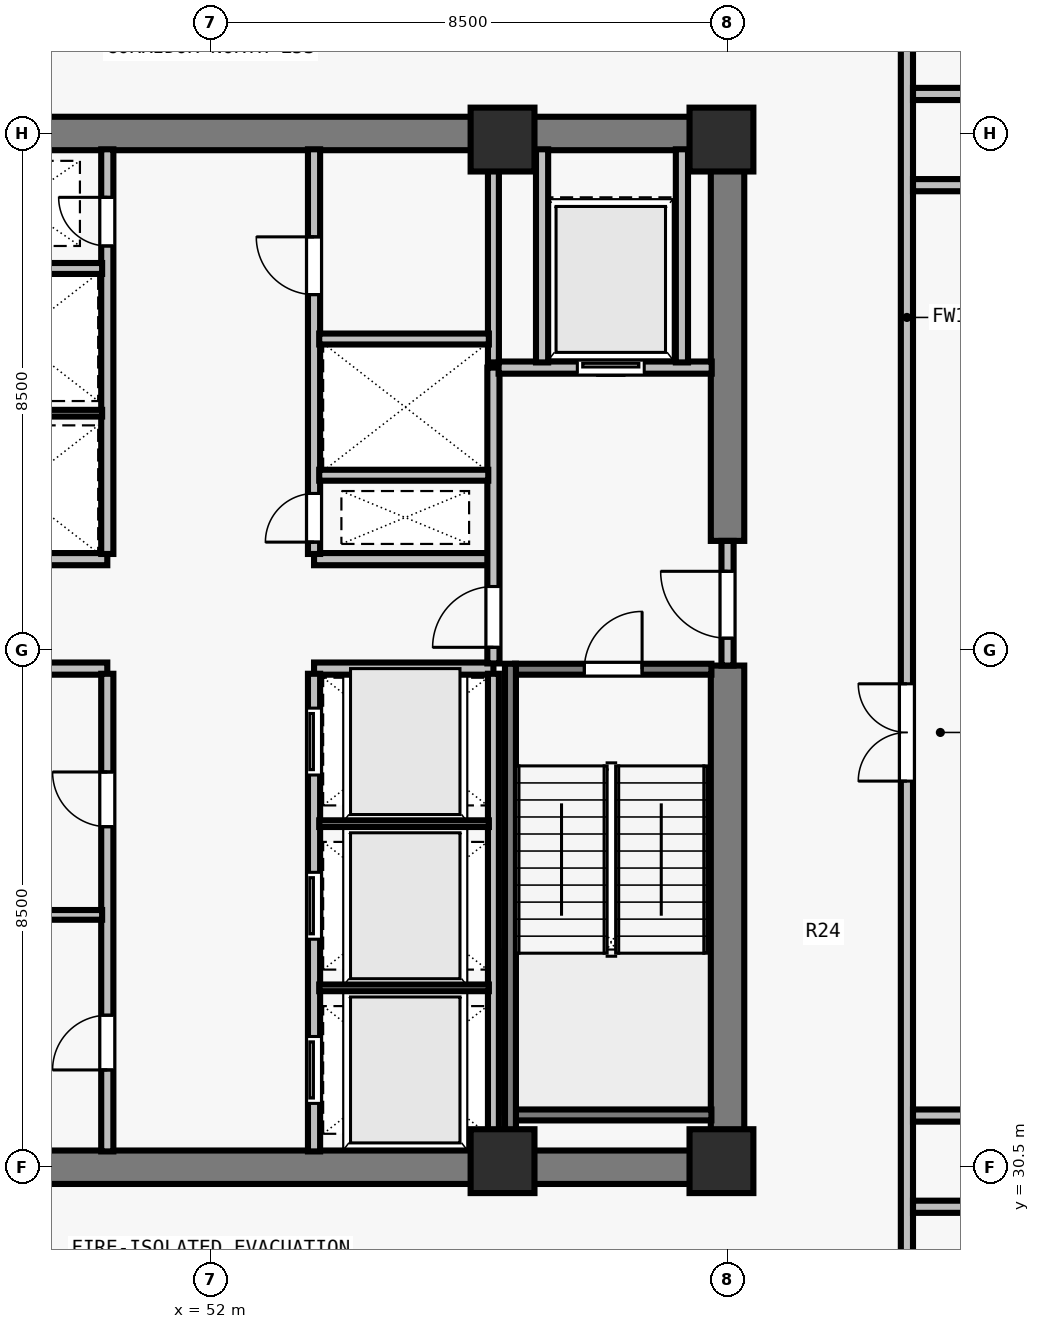
"""IFC4 building model, lengths in metres.
Left out: names, types, materials, properties, quantities, classifications, styles, units other than length and angle.
Written with IfcOpenShell. Run it as: python <this file> out.ifc"""

import sys

from ifc_helpers import new_model, si_unit, direction, frame, frame_2d, origin, origin_2d, place, context, subcontext, project, spatial, rectangle, extrude, element, fill, save


model = new_model("IFC4")
c1 = context("Model", 3, precision=1e-05, world=origin(), true_north=direction((0.0, 1.0)))
c2 = subcontext(c1, "Body", "Model", "MODEL_VIEW")
j1 = project(units=[si_unit("LENGTHUNIT", "METRE"), si_unit("PLANEANGLEUNIT", "RADIAN")], contexts=[c1])
p1 = place(None, origin())
s1 = spatial("IfcSite", under=j1, at=p1, CompositionType="ELEMENT")
p2 = place(p1, origin())
s2 = spatial("IfcBuilding", under=s1, at=p2, CompositionType="ELEMENT")
p3 = place(p2, frame((0.0, 0.0, 193.5)))
s3 = spatial("IfcBuildingStorey", under=s2, at=p3, CompositionType="ELEMENT", Elevation=193.5)
for number, where, z_axis, x_axis in (
    (1, (56.8, 30.6, 0.0), (0.0, 0.0, 1.0), (1.0, 0.0, 0.0)),
    (2, (60.4, 30.6, 0.0), (0.0, 0.0, 1.0), (1.0, 0.0, 0.0)),
    (3, (56.8, 47.4, 0.0), (0.0, 0.0, 1.0), (1.0, 0.0, 0.0)),
    (4, (60.4, 47.4, 0.0), (0.0, 0.0, 1.0), (1.0, 0.0, 0.0)),
):
    element("IfcColumn", number, at=place(p3, frame(where, z_axis=z_axis, x_axis=x_axis)), inside=s3, PredefinedType="COLUMN", context=c2, shape_type="SweptSolid", body=[
        extrude(rectangle(XDim=1.05, YDim=1.05, at=origin_2d()), origin(), (0.0, 0.0, 1.0), 4.5),
    ])
for number, where, z_axis, x_axis in (
    (5, (43.225, 30.5, 0.0), (0.0, 0.0, 1.0), (1.0, 0.0, 0.0)),
    (6, (43.225, 47.5, 0.0), (0.0, 0.0, 1.0), (1.0, 0.0, 0.0)),
):
    element("IfcWall", number, at=place(p3, frame(where, z_axis=z_axis, x_axis=x_axis)), inside=s3, PredefinedType="SHEAR", context=c2, shape_type="SweptSolid", body=[
        extrude(rectangle(XDim=17.55, YDim=0.55, at=frame_2d((8.775, 0.0))), origin(), (0.0, 0.0, 1.0), 4.29),
    ])
p4 = place(p3, frame((60.5, 30.765, 0.0), z_axis=(0.0, 0.0, 1.0), x_axis=(0.0, 1.0, 0.0)))
e7 = element("IfcWall", 7, at=p4, inside=s3, PredefinedType="SHEAR", context=c2, shape_type="SweptSolid", body=[
    extrude(rectangle(XDim=7.985, YDim=0.55, at=frame_2d((3.993, 0.0))), origin(), (0.0, 0.0, 1.0), 4.29),
])
p5 = place(p3, frame((60.5, 40.8, 0.0), z_axis=(0.0, 0.0, 1.0), x_axis=(0.0, 1.0, 0.0)))
e8 = element("IfcWall", 8, at=p5, inside=s3, PredefinedType="SHEAR", context=c2, shape_type="SweptSolid", body=[
    extrude(rectangle(XDim=6.435, YDim=0.55, at=frame_2d((3.218, 0.0))), origin(), (0.0, 0.0, 1.0), 4.29),
])
for number, where, z_axis, x_axis in (
    (9, (47.35, 38.7, 0.0), (0.0, 0.0, 1.0), (1.0, 0.0, 0.0)),
    (10, (47.35, 40.5, 0.0), (0.0, 0.0, 1.0), (1.0, 0.0, 0.0)),
    (11, (53.7, 38.7, 0.0), (0.0, 0.0, 1.0), (1.0, 0.0, 0.0)),
    (12, (53.7, 40.5, 0.0), (0.0, 0.0, 1.0), (1.0, 0.0, 0.0)),
):
    element("IfcWall", number, at=place(p3, frame(where, z_axis=z_axis, x_axis=x_axis)), inside=s3, PredefinedType="SOLIDWALL", context=c2, shape_type="SweptSolid", body=[
        extrude(rectangle(XDim=2.95, YDim=0.2, at=frame_2d((1.475, 0.0))), origin(), (0.0, 0.0, 1.0), 4.29),
    ])
p6 = place(p3, frame((50.3, 30.76, 0.0), z_axis=(0.0, 0.0, 1.0), x_axis=(0.0, 1.0, 0.0)))
e13 = element("IfcWall", 13, at=p6, inside=s3, PredefinedType="SOLIDWALL", context=c2, shape_type="SweptSolid", body=[
    extrude(rectangle(XDim=7.855, YDim=0.2, at=frame_2d((3.927, 0.0))), origin(), (0.0, 0.0, 1.0), 4.29),
])
p7 = place(p6, frame((1.34, 0.0, 0.0)))
e14 = element("IfcOpeningElement", 14, at=p7, cuts=e13, PredefinedType="OPENING", context=c2, shape_type="SweptSolid", body=[
    extrude(rectangle(XDim=0.9, YDim=2.12, at=frame_2d((0.45, 1.06))), frame((0.0, 0.11, 0.0), z_axis=(0.0, -1.0, 0.0), x_axis=(1.0, 0.0, 0.0)), (0.0, 0.0, 1.0), 0.22),
])
p8 = place(p6, frame((5.34, 0.0, 0.0)))
e15 = element("IfcOpeningElement", 15, at=p8, cuts=e13, PredefinedType="OPENING", context=c2, shape_type="SweptSolid", body=[
    extrude(rectangle(XDim=0.9, YDim=2.12, at=frame_2d((0.45, 1.06))), frame((0.0, 0.11, 0.0), z_axis=(0.0, -1.0, 0.0), x_axis=(1.0, 0.0, 0.0)), (0.0, 0.0, 1.0), 0.22),
])
p9 = place(p3, frame((53.7, 30.76, 0.0), z_axis=(0.0, 0.0, 1.0), x_axis=(0.0, 1.0, 0.0)))
e16 = element("IfcWall", 16, at=p9, inside=s3, PredefinedType="SOLIDWALL", context=c2, shape_type="SweptSolid", body=[
    extrude(rectangle(XDim=7.855, YDim=0.2, at=frame_2d((3.927, 0.0))), origin(), (0.0, 0.0, 1.0), 4.29),
])
p10 = place(p9, frame((0.79, 0.0, 0.0)))
e17 = element("IfcOpeningElement", 17, at=p10, cuts=e16, PredefinedType="OPENING", context=c2, shape_type="SweptSolid", body=[
    extrude(rectangle(XDim=1.1, YDim=2.2, at=frame_2d((0.55, 1.1))), frame((0.0, 0.11, 0.0), z_axis=(0.0, -1.0, 0.0), x_axis=(1.0, 0.0, 0.0)), (0.0, 0.0, 1.0), 0.22),
])
p11 = place(p9, frame((3.49, 0.0, 0.0)))
e18 = element("IfcOpeningElement", 18, at=p11, cuts=e16, PredefinedType="OPENING", context=c2, shape_type="SweptSolid", body=[
    extrude(rectangle(XDim=1.1, YDim=2.2, at=frame_2d((0.55, 1.1))), frame((0.0, 0.11, 0.0), z_axis=(0.0, -1.0, 0.0), x_axis=(1.0, 0.0, 0.0)), (0.0, 0.0, 1.0), 0.22),
])
p12 = place(p9, frame((6.19, 0.0, 0.0)))
e19 = element("IfcOpeningElement", 19, at=p12, cuts=e16, PredefinedType="OPENING", context=c2, shape_type="SweptSolid", body=[
    extrude(rectangle(XDim=1.1, YDim=2.2, at=frame_2d((0.55, 1.1))), frame((0.0, 0.11, 0.0), z_axis=(0.0, -1.0, 0.0), x_axis=(1.0, 0.0, 0.0)), (0.0, 0.0, 1.0), 0.22),
])
p13 = place(p3, frame((50.3, 40.585, 0.0), z_axis=(0.0, 0.0, 1.0), x_axis=(0.0, 1.0, 0.0)))
e20 = element("IfcWall", 20, at=p13, inside=s3, PredefinedType="SOLIDWALL", context=c2, shape_type="SweptSolid", body=[
    extrude(rectangle(XDim=6.655, YDim=0.2, at=frame_2d((3.328, 0.0))), origin(), (0.0, 0.0, 1.0), 4.29),
])
p14 = place(p13, frame((5.065, 0.0, 0.0)))
e21 = element("IfcOpeningElement", 21, at=p14, cuts=e20, PredefinedType="OPENING", context=c2, shape_type="SweptSolid", body=[
    extrude(rectangle(XDim=0.8, YDim=2.08, at=frame_2d((0.4, 1.04))), frame((0.0, 0.11, 0.0), z_axis=(0.0, -1.0, 0.0), x_axis=(1.0, 0.0, 0.0)), (0.0, 0.0, 1.0), 0.22),
])
p15 = place(p3, frame((53.7, 40.585, 0.0), z_axis=(0.0, 0.0, 1.0), x_axis=(0.0, 1.0, 0.0)))
e22 = element("IfcWall", 22, at=p15, inside=s3, PredefinedType="SOLIDWALL", context=c2, shape_type="SweptSolid", body=[
    extrude(rectangle(XDim=6.655, YDim=0.2, at=frame_2d((3.328, 0.0))), origin(), (0.0, 0.0, 1.0), 4.29),
])
p16 = place(p15, frame((0.195, 0.0, 0.0)))
e23 = element("IfcOpeningElement", 23, at=p16, cuts=e22, PredefinedType="OPENING", context=c2, shape_type="SweptSolid", body=[
    extrude(rectangle(XDim=0.8, YDim=2.08, at=frame_2d((0.4, 1.04))), frame((0.0, 0.11, 0.0), z_axis=(0.0, -1.0, 0.0), x_axis=(1.0, 0.0, 0.0)), (0.0, 0.0, 1.0), 0.22),
])
p17 = place(p15, frame((4.265, 0.0, 0.0)))
e24 = element("IfcOpeningElement", 24, at=p17, cuts=e22, PredefinedType="OPENING", context=c2, shape_type="SweptSolid", body=[
    extrude(rectangle(XDim=0.95, YDim=2.12, at=frame_2d((0.475, 1.06))), frame((0.0, 0.11, 0.0), z_axis=(0.0, -1.0, 0.0), x_axis=(1.0, 0.0, 0.0)), (0.0, 0.0, 1.0), 0.22),
])
p18 = place(p3, frame((60.5, 38.75, 0.0), z_axis=(0.0, 0.0, 1.0), x_axis=(0.0, 1.0, 0.0)))
e25 = element("IfcWall", 25, at=p18, inside=s3, PredefinedType="SOLIDWALL", context=c2, shape_type="SweptSolid", body=[
    extrude(rectangle(XDim=2.05, YDim=0.2, at=frame_2d((1.025, 0.0))), origin(), (0.0, 0.0, 1.0), 4.29),
])
p19 = place(p18, frame((0.45, 0.0, 0.0)))
e26 = element("IfcOpeningElement", 26, at=p19, cuts=e25, PredefinedType="OPENING", context=c2, shape_type="SweptSolid", body=[
    extrude(rectangle(XDim=1.1, YDim=2.15, at=frame_2d((0.55, 1.075))), frame((0.0, 0.11, 0.0), z_axis=(0.0, -1.0, 0.0), x_axis=(1.0, 0.0, 0.0)), (0.0, 0.0, 1.0), 0.22),
])
p20 = place(p3, frame((56.65, 38.785, 0.0), z_axis=(0.0, 0.0, 1.0), x_axis=(0.0, 1.0, 0.0)))
e27 = element("IfcWall", 27, at=p20, inside=s3, PredefinedType="SOLIDWALL", context=c2, shape_type="SweptSolid", body=[
    extrude(rectangle(XDim=4.865, YDim=0.2, at=frame_2d((2.433, 0.0))), origin(), (0.0, 0.0, 1.0), 4.29),
])
p21 = place(p20, frame((0.265, 0.0, 0.0)))
e28 = element("IfcOpeningElement", 28, at=p21, cuts=e27, PredefinedType="OPENING", context=c2, shape_type="SweptSolid", body=[
    extrude(rectangle(XDim=1.0, YDim=2.15, at=frame_2d((0.5, 1.075))), frame((0.0, 0.11, 0.0), z_axis=(0.0, -1.0, 0.0), x_axis=(1.0, 0.0, 0.0)), (0.0, 0.0, 1.0), 0.22),
])
p22 = place(p3, frame((56.735, 43.65, 0.0), z_axis=(0.0, 0.0, 1.0), x_axis=(1.0, 0.0, 0.0)))
e29 = element("IfcWall", 29, at=p22, inside=s3, PredefinedType="SOLIDWALL", context=c2, shape_type="SweptSolid", body=[
    extrude(rectangle(XDim=3.505, YDim=0.2, at=frame_2d((1.752, 0.0))), origin(), (0.0, 0.0, 1.0), 4.29),
])
p23 = place(p22, frame((1.295, 0.0, 0.0)))
e30 = element("IfcOpeningElement", 30, at=p23, cuts=e29, PredefinedType="OPENING", context=c2, shape_type="SweptSolid", body=[
    extrude(rectangle(XDim=1.1, YDim=2.2, at=frame_2d((0.55, 1.1))), frame((0.0, 0.11, 0.0), z_axis=(0.0, -1.0, 0.0), x_axis=(1.0, 0.0, 0.0)), (0.0, 0.0, 1.0), 0.22),
])
for number, where, z_axis, x_axis in (
    (31, (57.45, 43.735, 0.0), (0.0, 0.0, 1.0), (0.0, 1.0, 0.0)),
    (32, (59.75, 43.735, 0.0), (0.0, 0.0, 1.0), (0.0, 1.0, 0.0)),
):
    element("IfcWall", number, at=place(p3, frame(where, z_axis=z_axis, x_axis=x_axis)), inside=s3, PredefinedType="SOLIDWALL", context=c2, shape_type="SweptSolid", body=[
        extrude(rectangle(XDim=3.505, YDim=0.2, at=frame_2d((1.752, 0.0))), origin(), (0.0, 0.0, 1.0), 4.29),
    ])
p24 = place(p3, frame((47.415, 34.65, 0.0), z_axis=(0.0, 0.0, 1.0), x_axis=(1.0, 0.0, 0.0)))
e33 = element("IfcWall", 33, at=p24, inside=s3, PredefinedType="PARTITIONING", context=c2, shape_type="SweptSolid", body=[
    extrude(rectangle(XDim=2.8, YDim=0.16, at=frame_2d((1.4, 0.0))), origin(), (0.0, 0.0, 1.0), 4.29),
])
p25 = place(p3, frame((56.65, 30.76, 0.0), z_axis=(0.0, 0.0, 1.0), x_axis=(0.0, 1.0, 0.0)))
e34 = element("IfcWall", 34, at=p25, inside=s3, PredefinedType="SOLIDWALL", context=c2, shape_type="SweptSolid", body=[
    extrude(rectangle(XDim=7.855, YDim=0.18, at=frame_2d((3.927, 0.0))), origin(), (0.0, 0.0, 1.0), 4.29),
])
for number, where, z_axis, x_axis in (
    (35, (53.785, 33.45, 0.0), (0.0, 0.0, 1.0), (1.0, 0.0, 0.0)),
    (36, (53.785, 36.15, 0.0), (0.0, 0.0, 1.0), (1.0, 0.0, 0.0)),
):
    element("IfcWall", number, at=place(p3, frame(where, z_axis=z_axis, x_axis=x_axis)), inside=s3, PredefinedType="PARTITIONING", context=c2, shape_type="SweptSolid", body=[
        extrude(rectangle(XDim=2.79, YDim=0.11, at=frame_2d((1.395, 0.0))), origin(), (0.0, 0.0, 1.0), 4.29),
    ])
p26 = place(p3, frame((47.435, 42.9, 0.0), z_axis=(0.0, 0.0, 1.0), x_axis=(1.0, 0.0, 0.0)))
e37 = element("IfcWall", 37, at=p26, inside=s3, PredefinedType="PARTITIONING", context=c2, shape_type="SweptSolid", body=[
    extrude(rectangle(XDim=2.78, YDim=0.11, at=frame_2d((1.39, 0.0))), origin(), (0.0, 0.0, 1.0), 4.29),
])
p27 = place(p3, frame((47.425, 45.28, 0.0), z_axis=(0.0, 0.0, 1.0), x_axis=(1.0, 0.0, 0.0)))
e38 = element("IfcWall", 38, at=p27, inside=s3, PredefinedType="SOLIDWALL", context=c2, shape_type="SweptSolid", body=[
    extrude(rectangle(XDim=2.79, YDim=0.18, at=frame_2d((1.395, 0.0))), origin(), (0.0, 0.0, 1.0), 4.29),
])
p28 = place(p3, frame((56.65, 43.735, 0.0), z_axis=(0.0, 0.0, 1.0), x_axis=(0.0, 1.0, 0.0)))
e39 = element("IfcWall", 39, at=p28, inside=s3, PredefinedType="SOLIDWALL", context=c2, shape_type="SweptSolid", body=[
    extrude(rectangle(XDim=3.505, YDim=0.18, at=frame_2d((1.752, 0.0))), origin(), (0.0, 0.0, 1.0), 4.29),
])
p29 = place(p3, frame((53.785, 41.88, 0.0), z_axis=(0.0, 0.0, 1.0), x_axis=(1.0, 0.0, 0.0)))
e40 = element("IfcWall", 40, at=p29, inside=s3, PredefinedType="SOLIDWALL", context=c2, shape_type="SweptSolid", body=[
    extrude(rectangle(XDim=2.78, YDim=0.18, at=frame_2d((1.39, 0.0))), origin(), (0.0, 0.0, 1.0), 4.29),
])
p30 = place(p3, frame((53.785, 44.12, 0.0), z_axis=(0.0, 0.0, 1.0), x_axis=(1.0, 0.0, 0.0)))
e41 = element("IfcWall", 41, at=p30, inside=s3, PredefinedType="SOLIDWALL", context=c2, shape_type="SweptSolid", body=[
    extrude(rectangle(XDim=2.79, YDim=0.18, at=frame_2d((1.395, 0.0))), origin(), (0.0, 0.0, 1.0), 4.29),
])
p31 = place(p3, frame((63.45, 27.65, 0.0), z_axis=(0.0, 0.0, 1.0), x_axis=(0.0, 1.0, 0.0)))
e42 = element("IfcWall", 42, at=p31, inside=s3, PredefinedType="SOLIDWALL", context=c2, shape_type="SweptSolid", body=[
    extrude(rectangle(XDim=22.7, YDim=0.2, at=frame_2d((11.35, 0.0))), origin(), (0.0, 0.0, 1.0), 4.29),
])
p32 = place(p31, frame((9.2, 0.0, 0.0)))
e43 = element("IfcOpeningElement", 43, at=p32, cuts=e42, PredefinedType="OPENING", context=c2, shape_type="SweptSolid", body=[
    extrude(rectangle(XDim=1.6, YDim=2.2, at=frame_2d((0.8, 1.1))), frame((0.0, 0.11, 0.0), z_axis=(0.0, -1.0, 0.0), x_axis=(1.0, 0.0, 0.0)), (0.0, 0.0, 1.0), 0.22),
])
p33 = place(p3, frame((63.55, 29.85, 0.0), z_axis=(0.0, 0.0, 1.0), x_axis=(1.0, 0.0, 0.0)))
e44 = element("IfcWall", 44, at=p33, inside=s3, PredefinedType="SOLIDWALL", context=c2, shape_type="SweptSolid", body=[
    extrude(rectangle(XDim=12.125, YDim=0.2, at=frame_2d((6.062, 0.0))), origin(), (0.0, 0.0, 1.0), 4.29),
])
for number, where, z_axis, x_axis in (
    (45, (63.55, 31.35, 0.0), (0.0, 0.0, 1.0), (1.0, 0.0, 0.0)),
    (46, (63.55, 46.65, 0.0), (0.0, 0.0, 1.0), (1.0, 0.0, 0.0)),
):
    element("IfcWall", number, at=place(p3, frame(where, z_axis=z_axis, x_axis=x_axis)), inside=s3, PredefinedType="SOLIDWALL", context=c2, shape_type="SweptSolid", body=[
        extrude(rectangle(XDim=12.125, YDim=0.2, at=frame_2d((6.062, 0.0))), origin(), (0.0, 0.0, 1.0), 2.465),
    ])
p34 = place(p3, frame((63.55, 48.15, 0.0), z_axis=(0.0, 0.0, 1.0), x_axis=(1.0, 0.0, 0.0)))
e47 = element("IfcWall", 47, at=p34, inside=s3, PredefinedType="SOLIDWALL", context=c2, shape_type="SweptSolid", body=[
    extrude(rectangle(XDim=12.125, YDim=0.2, at=frame_2d((6.062, 0.0))), origin(), (0.0, 0.0, 1.0), 4.29),
])
p35 = place(p3, frame((57.005, 38.69, 0.0), z_axis=(0.0, 0.0, 1.0), x_axis=(1.0, 0.0, 0.0)))
e48 = element("IfcWall", 48, at=p35, inside=s3, PredefinedType="SOLIDWALL", context=c2, shape_type="SweptSolid", body=[
    extrude(rectangle(XDim=3.23, YDim=0.18, at=frame_2d((1.615, 0.0))), origin(), (0.0, 0.0, 1.0), 4.29),
])
p36 = place(p35, frame((1.14, 0.0, 0.0)))
e49 = element("IfcOpeningElement", 49, at=p36, cuts=e48, PredefinedType="OPENING", context=c2, shape_type="SweptSolid", body=[
    extrude(rectangle(XDim=0.95, YDim=2.15, at=frame_2d((0.475, 1.075))), frame((0.0, 0.1, 0.0), z_axis=(0.0, -1.0, 0.0), x_axis=(1.0, 0.0, 0.0)), (0.0, 0.0, 1.0), 0.2),
])
p37 = place(p3, frame((57.005, 31.36, 0.0), z_axis=(0.0, 0.0, 1.0), x_axis=(1.0, 0.0, 0.0)))
e50 = element("IfcWall", 50, at=p37, inside=s3, PredefinedType="SOLIDWALL", context=c2, shape_type="SweptSolid", body=[
    extrude(rectangle(XDim=3.23, YDim=0.18, at=frame_2d((1.615, 0.0))), origin(), (0.0, 0.0, 1.0), 4.29),
])
p38 = place(p3, frame((56.93, 38.78, 0.0), z_axis=(0.0, 0.0, 1.0), x_axis=(0.0, -1.0, 0.0)))
e51 = element("IfcWall", 51, at=p38, inside=s3, PredefinedType="SOLIDWALL", context=c2, shape_type="SweptSolid", body=[
    extrude(rectangle(XDim=8.017, YDim=0.18, at=frame_2d((4.009, 0.0))), origin(), (0.0, 0.0, 1.0), 4.29),
])
p39 = place(p19, origin())
e52 = element("IfcDoor", 52, at=p39, inside=s3, OperationType="SINGLE_SWING_RIGHT", PredefinedType="DOOR", context=c2, shape_type="SweptSolid", body=[
    extrude(rectangle(XDim=1.1, YDim=2.15, at=frame_2d((0.55, 1.075))), frame((0.0, 0.025, 0.0), z_axis=(0.0, -1.0, 0.0), x_axis=(1.0, 0.0, 0.0)), (0.0, 0.0, 1.0), 0.05),
])
fill(e26, e52)
p40 = place(p21, origin())
e53 = element("IfcDoor", 53, at=p40, inside=s3, OperationType="SINGLE_SWING_LEFT", PredefinedType="DOOR", context=c2, shape_type="SweptSolid", body=[
    extrude(rectangle(XDim=1.0, YDim=2.15, at=frame_2d((0.5, 1.075))), frame((0.0, 0.025, 0.0), z_axis=(0.0, -1.0, 0.0), x_axis=(1.0, 0.0, 0.0)), (0.0, 0.0, 1.0), 0.05),
])
fill(e28, e53)
p41 = place(p23, origin())
e54 = element("IfcDoor", 54, at=p41, inside=s3, OperationType="SLIDING_TO_LEFT", PredefinedType="DOOR", context=c2, shape_type="SweptSolid", body=[
    extrude(rectangle(XDim=1.1, YDim=2.2, at=frame_2d((0.55, 1.1))), frame((0.0, 0.025, 0.0), z_axis=(0.0, -1.0, 0.0), x_axis=(1.0, 0.0, 0.0)), (0.0, 0.0, 1.0), 0.05),
])
fill(e30, e54)
p42 = place(p7, origin())
e55 = element("IfcDoor", 55, at=p42, inside=s3, OperationType="SINGLE_SWING_LEFT", PredefinedType="DOOR", context=c2, shape_type="SweptSolid", body=[
    extrude(rectangle(XDim=0.9, YDim=2.12, at=frame_2d((0.45, 1.06))), frame((0.0, 0.025, 0.0), z_axis=(0.0, -1.0, 0.0), x_axis=(1.0, 0.0, 0.0)), (0.0, 0.0, 1.0), 0.05),
])
fill(e14, e55)
p43 = place(p8, origin())
e56 = element("IfcDoor", 56, at=p43, inside=s3, OperationType="SINGLE_SWING_RIGHT", PredefinedType="DOOR", context=c2, shape_type="SweptSolid", body=[
    extrude(rectangle(XDim=0.9, YDim=2.12, at=frame_2d((0.45, 1.06))), frame((0.0, 0.025, 0.0), z_axis=(0.0, -1.0, 0.0), x_axis=(1.0, 0.0, 0.0)), (0.0, 0.0, 1.0), 0.05),
])
fill(e15, e56)
p44 = place(p10, origin())
e57 = element("IfcDoor", 57, at=p44, inside=s3, OperationType="SLIDING_TO_LEFT", PredefinedType="DOOR", context=c2, shape_type="SweptSolid", body=[
    extrude(rectangle(XDim=1.1, YDim=2.2, at=frame_2d((0.55, 1.1))), frame((0.0, 0.025, 0.0), z_axis=(0.0, -1.0, 0.0), x_axis=(1.0, 0.0, 0.0)), (0.0, 0.0, 1.0), 0.05),
])
fill(e17, e57)
p45 = place(p11, origin())
e58 = element("IfcDoor", 58, at=p45, inside=s3, OperationType="SLIDING_TO_LEFT", PredefinedType="DOOR", context=c2, shape_type="SweptSolid", body=[
    extrude(rectangle(XDim=1.1, YDim=2.2, at=frame_2d((0.55, 1.1))), frame((0.0, 0.025, 0.0), z_axis=(0.0, -1.0, 0.0), x_axis=(1.0, 0.0, 0.0)), (0.0, 0.0, 1.0), 0.05),
])
fill(e18, e58)
p46 = place(p12, origin())
e59 = element("IfcDoor", 59, at=p46, inside=s3, OperationType="SLIDING_TO_LEFT", PredefinedType="DOOR", context=c2, shape_type="SweptSolid", body=[
    extrude(rectangle(XDim=1.1, YDim=2.2, at=frame_2d((0.55, 1.1))), frame((0.0, 0.025, 0.0), z_axis=(0.0, -1.0, 0.0), x_axis=(1.0, 0.0, 0.0)), (0.0, 0.0, 1.0), 0.05),
])
fill(e19, e59)
p47 = place(p14, origin())
e60 = element("IfcDoor", 60, at=p47, inside=s3, OperationType="SINGLE_SWING_RIGHT", PredefinedType="DOOR", context=c2, shape_type="SweptSolid", body=[
    extrude(rectangle(XDim=0.8, YDim=2.08, at=frame_2d((0.4, 1.04))), frame((0.0, 0.025, 0.0), z_axis=(0.0, -1.0, 0.0), x_axis=(1.0, 0.0, 0.0)), (0.0, 0.0, 1.0), 0.05),
])
fill(e21, e60)
p48 = place(p16, origin())
e61 = element("IfcDoor", 61, at=p48, inside=s3, OperationType="SINGLE_SWING_LEFT", PredefinedType="DOOR", context=c2, shape_type="SweptSolid", body=[
    extrude(rectangle(XDim=0.8, YDim=2.08, at=frame_2d((0.4, 1.04))), frame((0.0, 0.025, 0.0), z_axis=(0.0, -1.0, 0.0), x_axis=(1.0, 0.0, 0.0)), (0.0, 0.0, 1.0), 0.05),
])
fill(e23, e61)
p49 = place(p17, origin())
e62 = element("IfcDoor", 62, at=p49, inside=s3, OperationType="SINGLE_SWING_RIGHT", PredefinedType="DOOR", context=c2, shape_type="SweptSolid", body=[
    extrude(rectangle(XDim=0.95, YDim=2.12, at=frame_2d((0.475, 1.06))), frame((0.0, 0.025, 0.0), z_axis=(0.0, -1.0, 0.0), x_axis=(1.0, 0.0, 0.0)), (0.0, 0.0, 1.0), 0.05),
])
fill(e24, e62)
p50 = place(p32, origin())
e63 = element("IfcDoor", 63, at=p50, inside=s3, OperationType="DOUBLE_DOOR_SINGLE_SWING", PredefinedType="DOOR", context=c2, shape_type="SweptSolid", body=[
    extrude(rectangle(XDim=1.6, YDim=2.2, at=frame_2d((0.8, 1.1))), frame((0.0, 0.025, 0.0), z_axis=(0.0, -1.0, 0.0), x_axis=(1.0, 0.0, 0.0)), (0.0, 0.0, 1.0), 0.05),
])
fill(e43, e63)
p51 = place(p36, origin())
e64 = element("IfcDoor", 64, at=p51, inside=s3, OperationType="SINGLE_SWING_RIGHT", PredefinedType="DOOR", context=c2, shape_type="SweptSolid", body=[
    extrude(rectangle(XDim=0.95, YDim=2.15, at=frame_2d((0.475, 1.075))), frame((0.0, 0.025, 0.0), z_axis=(0.0, -1.0, 0.0), x_axis=(1.0, 0.0, 0.0)), (0.0, 0.0, 1.0), 0.05),
])
fill(e49, e64)
save(model, sys.argv[1])
